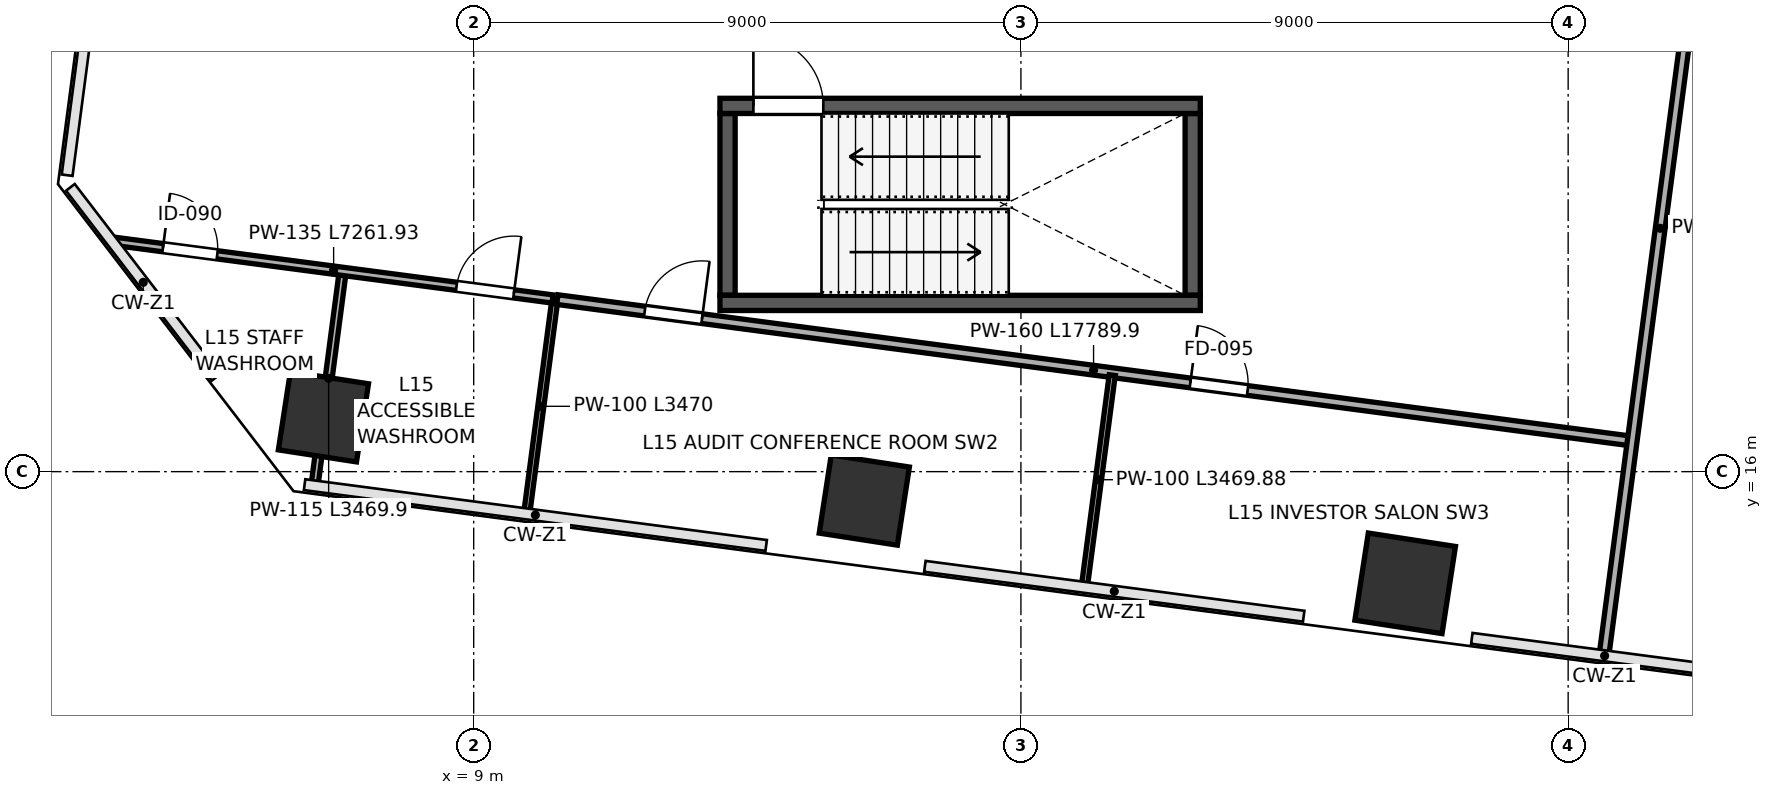
"""IFC4 building model, lengths in metres.
Left out: names, types, materials, properties, quantities, classifications, styles, units other than length and angle.
Written with IfcOpenShell. Run it as: python <this file> out.ifc"""

import sys

from ifc_helpers import new_model, si_unit, direction, frame, frame_2d, origin, origin_2d, place, context, subcontext, project, spatial, rectangle, extrude, clip, halfspace, source, transform, mapped, element, fill, save


model = new_model("IFC4")
c1 = context("Model", 3, precision=1e-05, world=origin(), true_north=direction((0.0, 1.0)))
c2 = subcontext(c1, "Body", "Model", "MODEL_VIEW")
j1 = project(units=[si_unit("LENGTHUNIT", "METRE"), si_unit("PLANEANGLEUNIT", "RADIAN")], contexts=[c1])
p1 = place(None, origin())
s1 = spatial("IfcSite", under=j1, at=p1, CompositionType="ELEMENT")
p2 = place(p1, origin())
s2 = spatial("IfcBuilding", under=s1, at=p2, CompositionType="ELEMENT")
p3 = place(p2, frame((0.0, 0.0, 70.6)))
s3 = spatial("IfcBuildingStorey", under=s2, at=p3, CompositionType="ELEMENT", Elevation=70.6)
p4 = place(p3, frame((6.529, 16.902, 0.0), z_axis=(-0.077133355222, 0.078173355518, 0.993951393177), x_axis=(0.809739835594, 0.586551189013, 0.016706325745)))
e1 = element("IfcColumn", 1, at=p4, inside=s3, PredefinedType="COLUMN", context=c2, shape_type="Clipping", body=[
    clip(clip(extrude(rectangle(XDim=1.3, YDim=1.3, at=origin_2d()), origin(), (0.0, 0.0, 1.0), 4.226), halfspace(frame((0.0, 0.0, 0.083), z_axis=(0.0, 0.0, -1.0), x_axis=(1.0, 0.0, 0.0)), False)), halfspace(frame((0.0, 0.0, 4.143), z_axis=(0.0, 0.0, 1.0), x_axis=(1.0, 0.0, 0.0)), False)),
])
p5 = place(p3, frame((15.424, 15.533, 0.0), z_axis=(-0.084865472679, 0.032360026758, 0.99586679843), x_axis=(0.493693256942, 0.8695263459, 0.01381672309)))
e2 = element("IfcColumn", 2, at=p5, inside=s3, PredefinedType="COLUMN", context=c2, shape_type="Clipping", body=[
    clip(clip(extrude(rectangle(XDim=1.3, YDim=1.3, at=origin_2d()), origin(), (0.0, 0.0, 1.0), 4.217), halfspace(frame((0.0, 0.0, 0.068), z_axis=(0.0, 0.0, -1.0), x_axis=(1.0, 0.0, 0.0)), False)), halfspace(frame((0.0, 0.0, 4.149), z_axis=(0.0, 0.0, 1.0), x_axis=(1.0, 0.0, 0.0)), False)),
])
p6 = place(p3, frame((24.32, 14.164, 0.0), z_axis=(-0.092426651612, -0.013600665704, 0.995626604689), x_axis=(0.005955662025, 0.999881272271, 0.01421166606)))
e3 = element("IfcColumn", 3, at=p6, inside=s3, PredefinedType="COLUMN", context=c2, shape_type="Clipping", body=[
    clip(clip(extrude(rectangle(XDim=1.45, YDim=1.45, at=origin_2d()), origin(), (0.0, 0.0, 1.0), 4.219), halfspace(frame((0.0, 0.0, 0.078), z_axis=(0.0, 0.0, -1.0), x_axis=(1.0, 0.0, 0.0)), False)), halfspace(frame((0.0, 0.0, 4.14), z_axis=(0.0, 0.0, 1.0), x_axis=(1.0, 0.0, 0.0)), False)),
])
for number, where, z_axis, x_axis in (
    (4, (13.175, 18.9, 0.0), (0.0, 0.0, 1.0), (0.0, 1.0, 0.0)),
    (5, (20.825, 18.9, 0.0), (0.0, 0.0, 1.0), (0.0, 1.0, 0.0)),
):
    element("IfcWall", number, at=place(p3, frame(where, z_axis=z_axis, x_axis=x_axis)), inside=s3, PredefinedType="SHEAR", context=c2, shape_type="SweptSolid", body=[
        extrude(rectangle(XDim=2.99, YDim=0.25, at=frame_2d((1.495, 0.0))), origin(), (0.0, 0.0, 1.0), 3.96),
    ])
p7 = place(p3, frame((13.05, 18.775, 0.0), z_axis=(0.0, 0.0, 1.0), x_axis=(1.0, 0.0, 0.0)))
e6 = element("IfcWall", 6, at=p7, inside=s3, PredefinedType="SHEAR", context=c2, shape_type="SweptSolid", body=[
    extrude(rectangle(XDim=7.9, YDim=0.25, at=frame_2d((3.95, 0.0))), origin(), (0.0, 0.0, 1.0), 3.96),
])
p8 = place(p3, frame((13.05, 22.015, 0.0), z_axis=(0.0, 0.0, 1.0), x_axis=(1.0, 0.0, 0.0)))
e7 = element("IfcWall", 7, at=p8, inside=s3, PredefinedType="SHEAR", context=c2, shape_type="SweptSolid", body=[
    extrude(rectangle(XDim=7.9, YDim=0.25, at=frame_2d((3.95, 0.0))), origin(), (0.0, 0.0, 1.0), 3.96),
])
p9 = place(p8, frame((0.55, 0.0, 0.0)))
e8 = element("IfcOpeningElement", 8, at=p9, cuts=e7, PredefinedType="OPENING", context=c2, shape_type="SweptSolid", body=[
    extrude(rectangle(XDim=1.15, YDim=2.2, at=frame_2d((0.575, 1.1))), frame((0.0, 0.135, 0.0), z_axis=(0.0, -1.0, 0.0), x_axis=(1.0, 0.0, 0.0)), (0.0, 0.0, 1.0), 0.27),
])
p10 = place(p3, frame((6.388, 15.814, 0.0), z_axis=(0.0, 0.0, 1.0), x_axis=(0.130587375571, 0.991436804512, 0.0)))
e9 = element("IfcWall", 9, at=p10, inside=s3, PredefinedType="PARTITIONING", context=c2, shape_type="SweptSolid", body=[
    extrude(rectangle(XDim=3.47, YDim=0.115, at=frame_2d((1.735, 0.0))), origin(), (0.0, 0.0, 1.0), 3.095),
])
p11 = place(p3, frame((9.878, 15.354, 0.0), z_axis=(0.0, 0.0, 1.0), x_axis=(0.130509110781, 0.991447110038, 0.0)))
e10 = element("IfcWall", 10, at=p11, inside=s3, PredefinedType="PARTITIONING", context=c2, shape_type="SweptSolid", body=[
    extrude(rectangle(XDim=3.47, YDim=0.1, at=frame_2d((1.735, 0.0))), origin(), (0.0, 0.0, 1.0), 3.095),
])
p12 = place(p3, frame((3.097, 19.788, 0.0), z_axis=(0.0, 0.0, 1.0), x_axis=(0.99144674145, -0.130511910828, 0.0)))
e11 = element("IfcWall", 11, at=p12, inside=s3, PredefinedType="PARTITIONING", context=c2, shape_type="SweptSolid", body=[
    extrude(rectangle(XDim=7.262, YDim=0.135, at=frame_2d((3.631, 0.0))), origin(), (0.0, 0.0, 1.0), 3.96),
])
p13 = place(p12, frame((0.8, 0.0, 0.0)))
e12 = element("IfcOpeningElement", 12, at=p13, cuts=e11, PredefinedType="OPENING", context=c2, shape_type="SweptSolid", body=[
    extrude(rectangle(XDim=0.9, YDim=2.15, at=frame_2d((0.45, 1.075))), frame((0.0, 0.078, 0.0), z_axis=(0.0, -1.0, 0.0), x_axis=(1.0, 0.0, 0.0)), (0.0, 0.0, 1.0), 0.155),
])
p14 = place(p12, frame((5.67, 0.0, 0.0)))
e13 = element("IfcOpeningElement", 13, at=p14, cuts=e11, PredefinedType="OPENING", context=c2, shape_type="SweptSolid", body=[
    extrude(rectangle(XDim=0.95, YDim=2.15, at=frame_2d((0.475, 1.075))), frame((0.0, 0.078, 0.0), z_axis=(0.0, -1.0, 0.0), x_axis=(1.0, 0.0, 0.0)), (0.0, 0.0, 1.0), 0.155),
])
p15 = place(p3, frame((10.376, 18.829, 0.0), z_axis=(0.0, 0.0, 1.0), x_axis=(0.99144504436, -0.130524802294, 0.0)))
e14 = element("IfcWall", 14, at=p15, inside=s3, PredefinedType="PARTITIONING", context=c2, shape_type="SweptSolid", body=[
    extrude(rectangle(XDim=17.79, YDim=0.16, at=frame_2d((8.895, 0.0))), origin(), (0.0, 0.0, 1.0), 3.96),
])
p16 = place(p15, frame((1.45, 0.0, 0.0)))
e15 = element("IfcOpeningElement", 15, at=p16, cuts=e14, PredefinedType="OPENING", context=c2, shape_type="SweptSolid", body=[
    extrude(rectangle(XDim=0.95, YDim=2.15, at=frame_2d((0.475, 1.075))), frame((0.0, 0.09, 0.0), z_axis=(0.0, -1.0, 0.0), x_axis=(1.0, 0.0, 0.0)), (0.0, 0.0, 1.0), 0.18),
])
p17 = place(p15, frame((10.5, 0.0, 0.0)))
e16 = element("IfcOpeningElement", 16, at=p17, cuts=e14, PredefinedType="OPENING", context=c2, shape_type="SweptSolid", body=[
    extrude(rectangle(XDim=0.95, YDim=2.15, at=frame_2d((0.475, 1.075))), frame((0.0, 0.09, 0.0), z_axis=(0.0, -1.0, 0.0), x_axis=(1.0, 0.0, 0.0)), (0.0, 0.0, 1.0), 0.18),
])
p18 = place(p3, frame((19.049, 14.147, 0.0), z_axis=(0.0, 0.0, 1.0), x_axis=(0.130518214887, 0.991445911577, 0.0)))
e17 = element("IfcWall", 17, at=p18, inside=s3, PredefinedType="PARTITIONING", context=c2, shape_type="SweptSolid", body=[
    extrude(rectangle(XDim=3.47, YDim=0.1, at=frame_2d((1.735, 0.0))), origin(), (0.0, 0.0, 1.0), 3.095),
])
p19 = place(p3, frame((27.595, 13.022, 0.0), z_axis=(0.0, 0.0, 1.0), x_axis=(0.130532558102, 0.991444023269, 0.0)))
e18 = element("IfcWall", 18, at=p19, inside=s3, PredefinedType="PARTITIONING", context=c2, shape_type="SweptSolid", body=[
    extrude(rectangle(XDim=14.08, YDim=0.16, at=frame_2d((7.04, 0.0))), origin(), (0.0, 0.0, 1.0), 3.96),
])
m1 = source(origin(), c2, "Body", "SweptSolid", [
    extrude(rectangle(XDim=1.15, YDim=2.2, at=frame_2d((0.575, 1.1))), frame((0.0, 0.025, 0.0), z_axis=(0.0, -1.0, 0.0), x_axis=(1.0, 0.0, 0.0)), (0.0, 0.0, 1.0), 0.05),
])
p20 = place(p9, origin())
e19 = element("IfcDoor", 19, at=p20, inside=s3, OperationType="SINGLE_SWING_LEFT", PredefinedType="DOOR", context=c2, shape_type="MappedRepresentation", body=[
    mapped(m1, transform((0.0, 0.0, 0.0), scale=1.0)),
])
fill(e8, e19)
m2 = source(origin(), c2, "Body", "SweptSolid", [
    extrude(rectangle(XDim=0.9, YDim=2.15, at=frame_2d((0.45, 1.075))), frame((0.0, 0.025, 0.0), z_axis=(0.0, -1.0, 0.0), x_axis=(1.0, 0.0, 0.0)), (0.0, 0.0, 1.0), 0.05),
])
p21 = place(p13, origin())
e20 = element("IfcDoor", 20, at=p21, inside=s3, OperationType="SINGLE_SWING_LEFT", PredefinedType="DOOR", context=c2, shape_type="MappedRepresentation", body=[
    mapped(m2, transform((0.0, 0.0, 0.0), scale=1.0)),
])
fill(e12, e20)
m3 = source(origin(), c2, "Body", "SweptSolid", [
    extrude(rectangle(XDim=0.95, YDim=2.15, at=frame_2d((0.475, 1.075))), frame((0.0, 0.025, 0.0), z_axis=(0.0, -1.0, 0.0), x_axis=(1.0, 0.0, 0.0)), (0.0, 0.0, 1.0), 0.05),
])
p22 = place(p14, origin())
e21 = element("IfcDoor", 21, at=p22, inside=s3, OperationType="SINGLE_SWING_RIGHT", PredefinedType="DOOR", context=c2, shape_type="MappedRepresentation", body=[
    mapped(m3, transform((0.0, 0.0, 0.0), scale=1.0)),
])
fill(e13, e21)
m4 = source(origin(), c2, "Body", "SweptSolid", [
    extrude(rectangle(XDim=0.95, YDim=2.15, at=frame_2d((0.475, 1.075))), frame((0.0, 0.025, 0.0), z_axis=(0.0, -1.0, 0.0), x_axis=(1.0, 0.0, 0.0)), (0.0, 0.0, 1.0), 0.05),
])
p23 = place(p16, origin())
e22 = element("IfcDoor", 22, at=p23, inside=s3, OperationType="SINGLE_SWING_RIGHT", PredefinedType="DOOR", context=c2, shape_type="MappedRepresentation", body=[
    mapped(m4, transform((0.0, 0.0, 0.0), scale=1.0)),
])
fill(e15, e22)
p24 = place(p17, origin())
e23 = element("IfcDoor", 23, at=p24, inside=s3, OperationType="SINGLE_SWING_LEFT", PredefinedType="DOOR", context=c2, shape_type="MappedRepresentation", body=[
    mapped(m4, transform((0.0, 0.0, 0.0), scale=1.0)),
])
fill(e16, e23)
save(model, sys.argv[1])
